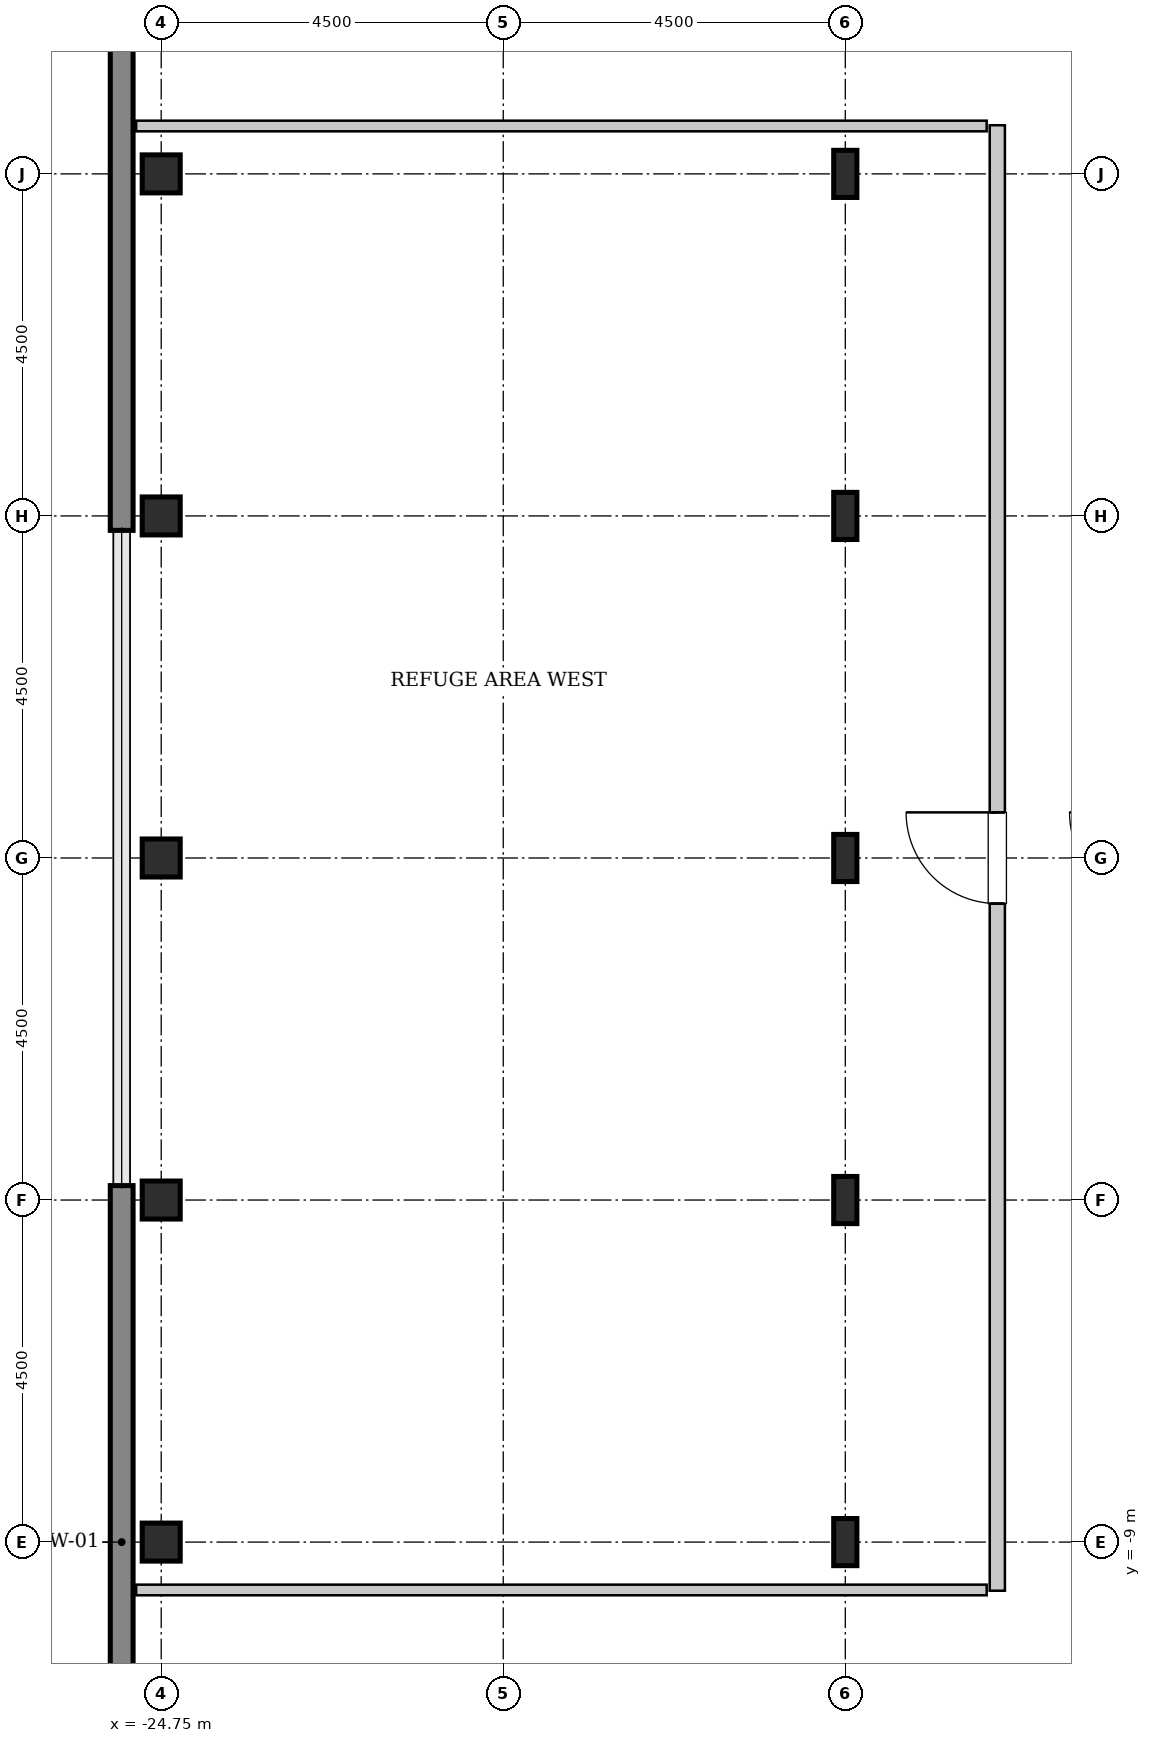
"""IFC4 building model, lengths in metres.
Left out: names, types, materials, properties, quantities, classifications, styles, units other than length and angle.
Written with IfcOpenShell. Run it as: python <this file> out.ifc"""

import sys

from ifc_helpers import new_model, si_unit, direction, frame, frame_2d, origin, origin_2d, place, context, subcontext, project, spatial, rectangle, hollow_rectangle, i_section, extrude, source, transform, mapped, element, fill, save


model = new_model("IFC4")
c1 = context("Model", 3, precision=1e-05, world=origin(), true_north=direction((0.0, 1.0)))
c2 = subcontext(c1, "Body", "Model", "MODEL_VIEW")
j1 = project(units=[si_unit("LENGTHUNIT", "METRE"), si_unit("PLANEANGLEUNIT", "RADIAN")], contexts=[c1])
p1 = place(None, origin())
s1 = spatial("IfcSite", under=j1, at=p1, CompositionType="ELEMENT")
p2 = place(p1, origin())
s2 = spatial("IfcBuilding", under=s1, at=p2, CompositionType="ELEMENT")
p3 = place(p2, frame((0.0, 0.0, 317.8)))
s3 = spatial("IfcBuildingStorey", under=s2, at=p3, CompositionType="ELEMENT", Elevation=317.8)
m1 = source(origin(), c2, "Body", "SweptSolid", [
    extrude(hollow_rectangle(XDim=0.5, YDim=0.5, WallThickness=0.025, InnerFilletRadius=0.025, OuterFilletRadius=0.05, at=origin_2d()), origin(), (0.0, 0.0, 1.0), 4.6),
])
for number, where, z_axis, x_axis in (
    (1, (-24.75, -9.0, 0.0), (0.0, 0.0, 1.0), (1.0, 0.0, 0.0)),
    (2, (-24.75, -4.5, 0.0), (0.0, 0.0, 1.0), (1.0, 0.0, 0.0)),
    (3, (-24.75, 0.0, 0.0), (0.0, 0.0, 1.0), (1.0, 0.0, 0.0)),
    (4, (-24.75, 4.5, 0.0), (0.0, 0.0, 1.0), (1.0, 0.0, 0.0)),
    (5, (-24.75, 9.0, 0.0), (0.0, 0.0, 1.0), (1.0, 0.0, 0.0)),
):
    element("IfcColumn", number, at=place(p3, frame(where, z_axis=z_axis, x_axis=x_axis)), inside=s3, PredefinedType="COLUMN", context=c2, shape_type="MappedRepresentation", body=[
        mapped(m1, transform((0.0, 0.0, 0.0), x_axis=(1.0, 0.0, 0.0), y_axis=(0.0, 1.0, 0.0), z_axis=(0.0, 0.0, 1.0), scale=1.0)),
    ])
m2 = source(origin(), c2, "Body", "SweptSolid", [
    extrude(i_section(OverallWidth=0.305, OverallDepth=0.62, WebThickness=0.021, FlangeThickness=0.04, FilletRadius=0.027, at=origin_2d()), origin(), (0.0, 0.0, 1.0), 4.6),
])
for number, where, z_axis, x_axis in (
    (6, (-15.75, -9.0, 0.0), (0.0, 0.0, 1.0), (1.0, 0.0, 0.0)),
    (7, (-15.75, -4.5, 0.0), (0.0, 0.0, 1.0), (1.0, 0.0, 0.0)),
    (8, (-15.75, 0.0, 0.0), (0.0, 0.0, 1.0), (1.0, 0.0, 0.0)),
    (9, (-15.75, 4.5, 0.0), (0.0, 0.0, 1.0), (1.0, 0.0, 0.0)),
    (10, (-15.75, 9.0, 0.0), (0.0, 0.0, 1.0), (1.0, 0.0, 0.0)),
):
    element("IfcColumn", number, at=place(p3, frame(where, z_axis=z_axis, x_axis=x_axis)), inside=s3, PredefinedType="COLUMN", context=c2, shape_type="MappedRepresentation", body=[
        mapped(m2, transform((0.0, 0.0, 0.0), x_axis=(1.0, 0.0, 0.0), y_axis=(0.0, 1.0, 0.0), z_axis=(0.0, 0.0, 1.0), scale=1.0)),
    ])
m3 = source(origin(), c2, "Body", "SweptSolid", [
    extrude(rectangle(XDim=9.38, YDim=0.3, at=frame_2d((4.69, 0.0))), origin(), (0.0, 0.0, 1.0), 4.35),
])
for number, where, z_axis, x_axis in (
    (11, (-25.27, -13.69, 0.0), (0.0, 0.0, 1.0), (0.0, 1.0, 0.0)),
    (12, (-25.27, 4.31, 0.0), (0.0, 0.0, 1.0), (0.0, 1.0, 0.0)),
):
    element("IfcWall", number, at=place(p3, frame(where, z_axis=z_axis, x_axis=x_axis)), inside=s3, PredefinedType="SHEAR", context=c2, shape_type="MappedRepresentation", body=[
        mapped(m3, transform((0.0, 0.0, 0.0), x_axis=(1.0, 0.0, 0.0), y_axis=(0.0, 1.0, 0.0), z_axis=(0.0, 0.0, 1.0), scale=1.0)),
    ])
m4 = source(origin(), c2, "Body", "SweptSolid", [
    extrude(rectangle(XDim=19.28, YDim=0.2, at=frame_2d((9.64, 0.0))), origin(), (0.0, 0.0, 1.0), 4.335),
])
p4 = place(p3, frame((-13.75, -9.64, 0.0), z_axis=(0.0, 0.0, 1.0), x_axis=(0.0, 1.0, 0.0)))
e13 = element("IfcWall", 13, at=p4, inside=s3, PredefinedType="SOLIDWALL", context=c2, shape_type="MappedRepresentation", body=[
    mapped(m4, transform((0.0, 0.0, 0.0), x_axis=(1.0, 0.0, 0.0), y_axis=(0.0, 1.0, 0.0), z_axis=(0.0, 0.0, 1.0), scale=1.0)),
])
p5 = place(p4, frame((9.04, 0.0, 0.0)))
e14 = element("IfcOpeningElement", 14, at=p5, cuts=e13, PredefinedType="OPENING", context=c2, shape_type="SweptSolid", body=[
    extrude(rectangle(XDim=1.2, YDim=2.15, at=frame_2d((0.6, 1.075))), frame((0.0, 0.11, 0.0), z_axis=(0.0, -1.0, 0.0), x_axis=(1.0, 0.0, 0.0)), (0.0, 0.0, 1.0), 0.22),
])
m5 = source(origin(), c2, "Body", "SweptSolid", [
    extrude(rectangle(XDim=11.19, YDim=0.14, at=frame_2d((5.595, 0.0))), origin(), (0.0, 0.0, 1.0), 4.335),
])
for number, where, z_axis, x_axis in (
    (15, (-25.08, -9.63, 0.0), (0.0, 0.0, 1.0), (1.0, 0.0, 0.0)),
    (16, (-25.08, 9.63, 0.0), (0.0, 0.0, 1.0), (1.0, 0.0, 0.0)),
):
    element("IfcWall", number, at=place(p3, frame(where, z_axis=z_axis, x_axis=x_axis)), inside=s3, PredefinedType="PARTITIONING", context=c2, shape_type="MappedRepresentation", body=[
        mapped(m5, transform((0.0, 0.0, 0.0), x_axis=(1.0, 0.0, 0.0), y_axis=(0.0, 1.0, 0.0), z_axis=(0.0, 0.0, 1.0), scale=1.0)),
    ])
m6 = source(origin(), c2, "Body", "SweptSolid", [
    extrude(rectangle(XDim=1.2, YDim=2.15, at=frame_2d((0.6, 1.075))), frame((0.0, 0.025, 0.0), z_axis=(0.0, -1.0, 0.0), x_axis=(1.0, 0.0, 0.0)), (0.0, 0.0, 1.0), 0.05),
])
p6 = place(p5, origin())
e17 = element("IfcDoor", 17, at=p6, inside=s3, OperationType="SINGLE_SWING_RIGHT", PredefinedType="DOOR", context=c2, shape_type="MappedRepresentation", body=[
    mapped(m6, transform((0.0, 0.0, 0.0), x_axis=(1.0, 0.0, 0.0), y_axis=(0.0, 1.0, 0.0), z_axis=(0.0, 0.0, 1.0), scale=1.0)),
])
fill(e14, e17)
save(model, sys.argv[1])
